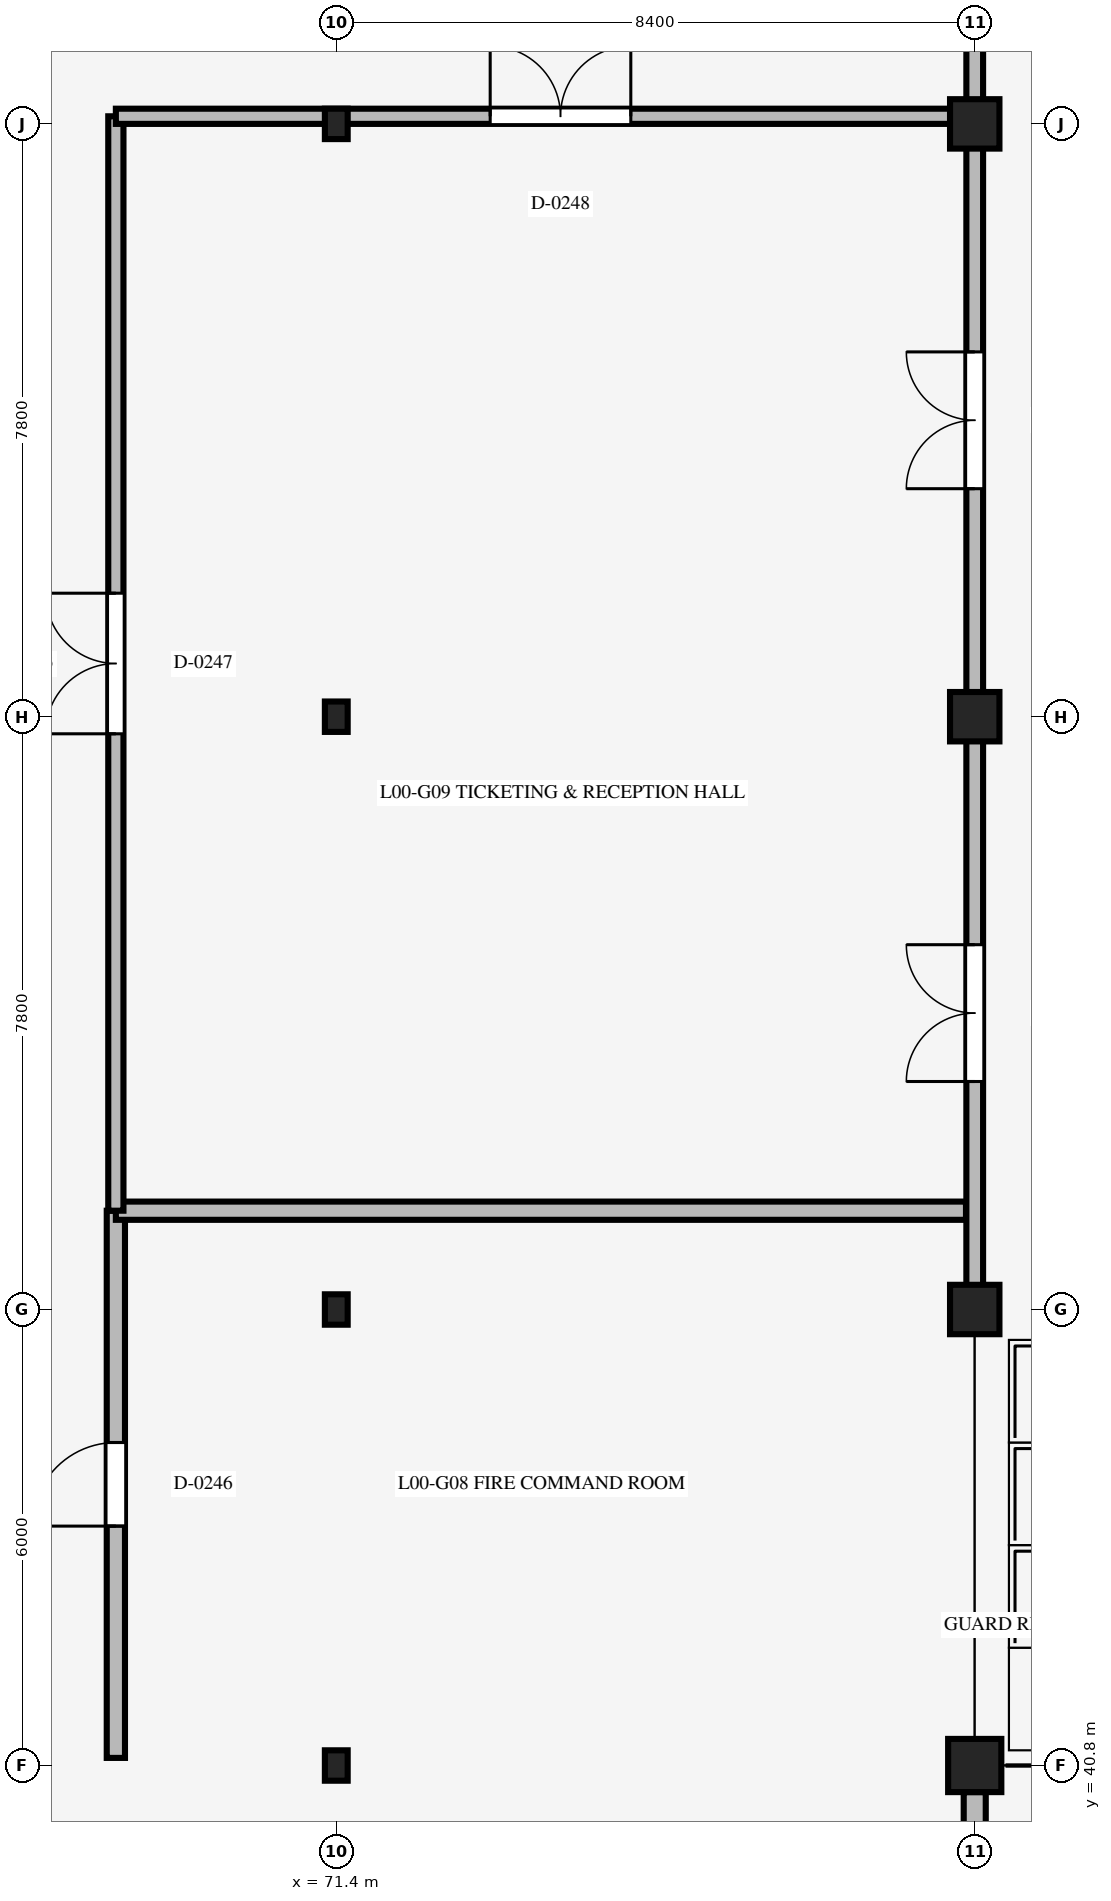
"""IFC4 building model, lengths in metres.
Left out: names, types, materials, properties, quantities, classifications, styles, units other than length and angle.
Written with IfcOpenShell. Run it as: python <this file> out.ifc"""

import sys

from ifc_helpers import new_model, si_unit, direction, frame, frame_2d, origin, origin_2d, place, context, subcontext, project, spatial, rectangle, i_section, extrude, element, fill, save


model = new_model("IFC4")
c1 = context("Model", 3, precision=1e-05, world=origin(), true_north=direction((0.0, 1.0)))
c2 = subcontext(c1, "Body", "Model", "MODEL_VIEW")
j1 = project(units=[si_unit("LENGTHUNIT", "METRE"), si_unit("PLANEANGLEUNIT", "RADIAN")], contexts=[c1])
p1 = place(None, origin())
s1 = spatial("IfcSite", under=j1, at=p1, CompositionType="ELEMENT")
p2 = place(p1, origin())
s2 = spatial("IfcBuilding", under=s1, at=p2, CompositionType="ELEMENT")
p3 = place(p2, origin())
s3 = spatial("IfcBuildingStorey", under=s2, at=p3, CompositionType="ELEMENT", Elevation=0.0)
for number, where, z_axis, x_axis in (
    (1, (71.4, 40.8, 0.0), (0.0, 0.0, 1.0), (1.0, 0.0, 0.0)),
    (2, (71.4, 46.8, 0.0), (0.0, 0.0, 1.0), (1.0, 0.0, 0.0)),
    (3, (71.4, 54.6, 0.0), (0.0, 0.0, 1.0), (1.0, 0.0, 0.0)),
    (4, (71.4, 62.4, 0.0), (0.0, 0.0, 1.0), (1.0, 0.0, 0.0)),
):
    element("IfcColumn", number, at=place(p3, frame(where, z_axis=z_axis, x_axis=x_axis)), inside=s3, PredefinedType="COLUMN", context=c2, shape_type="SweptSolid", body=[
        extrude(i_section(OverallWidth=0.3, OverallDepth=0.4, WebThickness=0.013, FlangeThickness=0.024, FilletRadius=0.027, at=origin_2d()), origin(), (0.0, 0.0, 1.0), 6.0),
    ])
p4 = place(p3, frame((79.8, 40.8, 0.0), z_axis=(0.0, 0.0, 1.0), x_axis=(1.0, 0.0, 0.0)))
e5 = element("IfcColumn", 5, at=p4, inside=s3, PredefinedType="COLUMN", context=c2, shape_type="SweptSolid", body=[
    extrude(rectangle(XDim=0.7, YDim=0.7, at=origin_2d()), origin(), (0.0, 0.0, 1.0), 6.0),
])
for number, where, z_axis, x_axis in (
    (6, (79.8, 46.8, 0.0), (0.0, 0.0, 1.0), (1.0, 0.0, 0.0)),
    (7, (79.8, 54.6, 0.0), (0.0, 0.0, 1.0), (1.0, 0.0, 0.0)),
    (8, (79.8, 62.4, 0.0), (0.0, 0.0, 1.0), (1.0, 0.0, 0.0)),
):
    element("IfcColumn", number, at=place(p3, frame(where, z_axis=z_axis, x_axis=x_axis)), inside=s3, PredefinedType="COLUMN", context=c2, shape_type="SweptSolid", body=[
        extrude(rectangle(XDim=0.65, YDim=0.65, at=origin_2d()), origin(), (0.0, 0.0, 1.0), 6.0),
    ])
p5 = place(p3, frame((79.8, 40.45, 0.0), z_axis=(0.0, 0.0, 1.0), x_axis=(0.0, -1.0, 0.0)))
e9 = element("IfcWall", 9, at=p5, inside=s3, PredefinedType="STANDARD", context=c2, shape_type="SweptSolid", body=[
    extrude(rectangle(XDim=7.76, YDim=0.29, at=frame_2d((3.88, 0.0))), origin(), (0.0, 0.0, 1.0), 5.211),
])
p6 = place(p5, frame((2.75, 0.0, 0.0)))
e10 = element("IfcOpeningElement", 10, at=p6, cuts=e9, PredefinedType="OPENING", context=c2, shape_type="SweptSolid", body=[
    extrude(rectangle(XDim=2.2, YDim=2.6, at=frame_2d((1.1, 1.3))), frame((0.0, 0.155, 0.0), z_axis=(0.0, -1.0, 0.0), x_axis=(1.0, 0.0, 0.0)), (0.0, 0.0, 1.0), 0.31),
])
p7 = place(p3, frame((68.5, 40.9, 0.0), z_axis=(0.0, 0.0, 1.0), x_axis=(0.0, 1.0, 0.0)))
e11 = element("IfcWall", 11, at=p7, inside=s3, PredefinedType="STANDARD", context=c2, shape_type="SweptSolid", body=[
    extrude(rectangle(XDim=7.2, YDim=0.24, at=frame_2d((3.6, 0.0))), origin(), (0.0, 0.0, 1.0), 3.05),
])
p8 = place(p7, frame((3.05, 0.0, 0.0)))
e12 = element("IfcOpeningElement", 12, at=p8, cuts=e11, PredefinedType="OPENING", context=c2, shape_type="SweptSolid", body=[
    extrude(rectangle(XDim=1.1, YDim=2.2, at=frame_2d((0.55, 1.1))), frame((0.0, 0.13, 0.0), z_axis=(0.0, -1.0, 0.0), x_axis=(1.0, 0.0, 0.0)), (0.0, 0.0, 1.0), 0.26),
])
p9 = place(p3, frame((68.5, 48.1, 0.0), z_axis=(0.0, 0.0, 1.0), x_axis=(1.0, 0.0, 0.0)))
e13 = element("IfcWall", 13, at=p9, inside=s3, PredefinedType="STANDARD", context=c2, shape_type="SweptSolid", body=[
    extrude(rectangle(XDim=11.185, YDim=0.24, at=frame_2d((5.593, 0.0))), origin(), (0.0, 0.0, 1.0), 3.05),
])
p10 = place(p3, frame((68.5, 48.1, 0.0), z_axis=(0.0, 0.0, 1.0), x_axis=(0.0, 1.0, 0.0)))
e14 = element("IfcWall", 14, at=p10, inside=s3, PredefinedType="STANDARD", context=c2, shape_type="SweptSolid", body=[
    extrude(rectangle(XDim=14.4, YDim=0.2, at=frame_2d((7.2, 0.0))), origin(), (0.0, 0.0, 1.0), 3.05),
])
p11 = place(p10, frame((6.275, 0.0, 0.0)))
e15 = element("IfcOpeningElement", 15, at=p11, cuts=e14, PredefinedType="OPENING", context=c2, shape_type="SweptSolid", body=[
    extrude(rectangle(XDim=1.85, YDim=2.25, at=frame_2d((0.925, 1.125))), frame((0.0, 0.11, 0.0), z_axis=(0.0, -1.0, 0.0), x_axis=(1.0, 0.0, 0.0)), (0.0, 0.0, 1.0), 0.22),
])
p12 = place(p3, frame((68.5, 62.5, 0.0), z_axis=(0.0, 0.0, 1.0), x_axis=(1.0, 0.0, 0.0)))
e16 = element("IfcWall", 16, at=p12, inside=s3, PredefinedType="STANDARD", context=c2, shape_type="SweptSolid", body=[
    extrude(rectangle(XDim=11.0, YDim=0.2, at=frame_2d((5.5, 0.0))), origin(), (0.0, 0.0, 1.0), 3.05),
])
p13 = place(p12, frame((4.925, 0.0, 0.0)))
e17 = element("IfcOpeningElement", 17, at=p13, cuts=e16, PredefinedType="OPENING", context=c2, shape_type="SweptSolid", body=[
    extrude(rectangle(XDim=1.85, YDim=2.25, at=frame_2d((0.925, 1.125))), frame((0.0, 0.11, 0.0), z_axis=(0.0, -1.0, 0.0), x_axis=(1.0, 0.0, 0.0)), (0.0, 0.0, 1.0), 0.22),
])
p14 = place(p3, frame((79.8, 47.1, 0.0), z_axis=(0.0, 0.0, 1.0), x_axis=(0.0, 1.0, 0.0)))
e18 = element("IfcWall", 18, at=p14, inside=s3, PredefinedType="STANDARD", context=c2, shape_type="SweptSolid", body=[
    extrude(rectangle(XDim=7.2, YDim=0.22, at=frame_2d((3.6, 0.0))), origin(), (0.0, 0.0, 1.0), 3.05),
])
p15 = place(p14, frame((2.7, 0.0, 0.0)))
e19 = element("IfcOpeningElement", 19, at=p15, cuts=e18, PredefinedType="OPENING", context=c2, shape_type="SweptSolid", body=[
    extrude(rectangle(XDim=1.8, YDim=2.3, at=frame_2d((0.9, 1.15))), frame((0.0, 0.12, 0.0), z_axis=(0.0, -1.0, 0.0), x_axis=(1.0, 0.0, 0.0)), (0.0, 0.0, 1.0), 0.24),
])
p16 = place(p3, frame((79.8, 54.9, 0.0), z_axis=(0.0, 0.0, 1.0), x_axis=(0.0, 1.0, 0.0)))
e20 = element("IfcWall", 20, at=p16, inside=s3, PredefinedType="STANDARD", context=c2, shape_type="SweptSolid", body=[
    extrude(rectangle(XDim=7.2, YDim=0.22, at=frame_2d((3.6, 0.0))), origin(), (0.0, 0.0, 1.0), 3.05),
])
p17 = place(p16, frame((2.7, 0.0, 0.0)))
e21 = element("IfcOpeningElement", 21, at=p17, cuts=e20, PredefinedType="OPENING", context=c2, shape_type="SweptSolid", body=[
    extrude(rectangle(XDim=1.8, YDim=2.3, at=frame_2d((0.9, 1.15))), frame((0.0, 0.12, 0.0), z_axis=(0.0, -1.0, 0.0), x_axis=(1.0, 0.0, 0.0)), (0.0, 0.0, 1.0), 0.24),
])
p18 = place(p3, frame((79.8, 62.7, 0.0), z_axis=(0.0, 0.0, 1.0), x_axis=(0.0, 1.0, 0.0)))
e22 = element("IfcWall", 22, at=p18, inside=s3, PredefinedType="STANDARD", context=c2, shape_type="SweptSolid", body=[
    extrude(rectangle(XDim=5.4, YDim=0.22, at=frame_2d((2.7, 0.0))), origin(), (0.0, 0.0, 1.0), 3.05),
])
p19 = place(p18, frame((1.8, 0.0, 0.0)))
e23 = element("IfcOpeningElement", 23, at=p19, cuts=e22, PredefinedType="OPENING", context=c2, shape_type="SweptSolid", body=[
    extrude(rectangle(XDim=1.8, YDim=2.3, at=frame_2d((0.9, 1.15))), frame((0.0, 0.12, 0.0), z_axis=(0.0, -1.0, 0.0), x_axis=(1.0, 0.0, 0.0)), (0.0, 0.0, 1.0), 0.24),
])
p20 = place(p8, origin())
e24 = element("IfcDoor", 24, at=p20, inside=s3, OperationType="SINGLE_SWING_LEFT", PredefinedType="DOOR", context=c2, shape_type="SweptSolid", body=[
    extrude(rectangle(XDim=1.1, YDim=2.2, at=frame_2d((0.55, 1.1))), frame((0.0, 0.025, 0.0), z_axis=(0.0, -1.0, 0.0), x_axis=(1.0, 0.0, 0.0)), (0.0, 0.0, 1.0), 0.05),
])
fill(e12, e24)
p21 = place(p11, origin())
e25 = element("IfcDoor", 25, at=p21, inside=s3, OperationType="DOUBLE_DOOR_SINGLE_SWING", PredefinedType="DOOR", context=c2, shape_type="SweptSolid", body=[
    extrude(rectangle(XDim=1.85, YDim=2.25, at=frame_2d((0.925, 1.125))), frame((0.0, 0.025, 0.0), z_axis=(0.0, -1.0, 0.0), x_axis=(1.0, 0.0, 0.0)), (0.0, 0.0, 1.0), 0.05),
])
fill(e15, e25)
p22 = place(p13, origin())
e26 = element("IfcDoor", 26, at=p22, inside=s3, OperationType="DOUBLE_DOOR_SINGLE_SWING", PredefinedType="DOOR", context=c2, shape_type="SweptSolid", body=[
    extrude(rectangle(XDim=1.85, YDim=2.25, at=frame_2d((0.925, 1.125))), frame((0.0, 0.025, 0.0), z_axis=(0.0, -1.0, 0.0), x_axis=(1.0, 0.0, 0.0)), (0.0, 0.0, 1.0), 0.05),
])
fill(e17, e26)
p23 = place(p15, origin())
e27 = element("IfcDoor", 27, at=p23, inside=s3, OperationType="DOUBLE_DOOR_SINGLE_SWING", PredefinedType="DOOR", context=c2, shape_type="SweptSolid", body=[
    extrude(rectangle(XDim=1.8, YDim=2.3, at=frame_2d((0.9, 1.15))), frame((0.0, 0.025, 0.0), z_axis=(0.0, -1.0, 0.0), x_axis=(1.0, 0.0, 0.0)), (0.0, 0.0, 1.0), 0.05),
])
fill(e19, e27)
p24 = place(p17, origin())
e28 = element("IfcDoor", 28, at=p24, inside=s3, OperationType="DOUBLE_DOOR_SINGLE_SWING", PredefinedType="DOOR", context=c2, shape_type="SweptSolid", body=[
    extrude(rectangle(XDim=1.8, YDim=2.3, at=frame_2d((0.9, 1.15))), frame((0.0, 0.025, 0.0), z_axis=(0.0, -1.0, 0.0), x_axis=(1.0, 0.0, 0.0)), (0.0, 0.0, 1.0), 0.05),
])
fill(e21, e28)
save(model, sys.argv[1])
